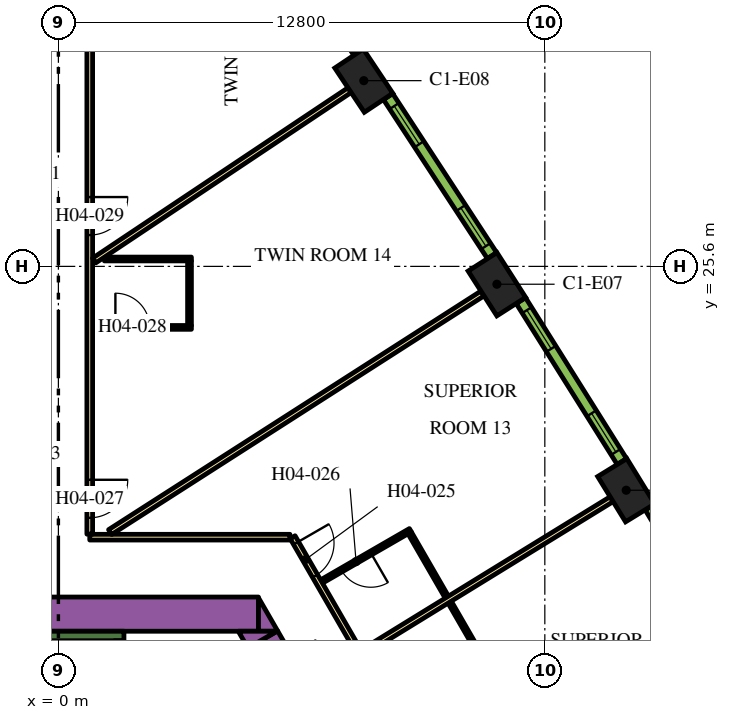
"""IFC4 building model, lengths in metres.
Left out: names, types, materials, properties, quantities, classifications, styles, units other than length and angle.
Written with IfcOpenShell. Run it as: python <this file> out.ifc"""

import sys

from ifc_helpers import new_model, si_unit, direction, frame, frame_2d, origin, origin_2d, place, context, subcontext, project, spatial, polyline, rectangle, outline, extrude, element, fill, save


model = new_model("IFC4")
c1 = context("Model", 3, precision=1e-05, world=origin(), true_north=direction((0.0, 1.0)))
c2 = subcontext(c1, "Body", "Model", "MODEL_VIEW")
j1 = project(units=[si_unit("LENGTHUNIT", "METRE"), si_unit("PLANEANGLEUNIT", "RADIAN")], contexts=[c1])
p1 = place(None, origin())
s1 = spatial("IfcSite", under=j1, at=p1, CompositionType="ELEMENT")
p2 = place(p1, origin())
s2 = spatial("IfcBuilding", under=s1, at=p2, CompositionType="ELEMENT")
p3 = place(p2, frame((0.0, 0.0, 66.6)))
s3 = spatial("IfcBuildingStorey", under=s2, at=p3, CompositionType="ELEMENT", Elevation=66.6)
for number, where, z_axis, x_axis in (
    (1, (14.942, 19.71, 0.0), (0.0, 0.0, 1.0), (-0.524, 0.852, 0.0)),
    (2, (11.539, 25.131, 0.0), (0.0, 0.0, 1.0), (-0.539, 0.842, 0.0)),
    (3, (8.037, 30.487, 0.0), (0.0, 0.0, 1.0), (-0.555, 0.832, 0.0)),
):
    element("IfcColumn", number, at=place(p3, frame(where, z_axis=z_axis, x_axis=x_axis)), inside=s3, PredefinedType="COLUMN", context=c2, shape_type="SweptSolid", body=[
        extrude(rectangle(XDim=1.4, YDim=0.9, at=origin_2d()), origin(), (0.0, 0.0, 1.0), 3.9),
    ])
p4 = place(p3, frame((-4.224, 16.45, 0.0), z_axis=(0.0, 0.0, 1.0), x_axis=(1.0, 0.0, 0.0)))
e4 = element("IfcWall", 4, at=p4, inside=s3, PredefinedType="SOLIDWALL", context=c2, shape_type="SweptSolid", body=[
    extrude(rectangle(XDim=9.488, YDim=0.9, at=frame_2d((4.744, 0.0))), origin(), (0.0, 0.0, 1.0), 3.9),
])
p5 = place(p3, origin())
e5 = element("IfcWall", 5, at=p5, inside=s3, PredefinedType="SOLIDWALL", context=c2, shape_type="SweptSolid", body=[
    extrude(outline(polyline([(5.265, 16.0), (5.265, 16.88), (5.773, 16.0), (5.265, 16.0)])), origin(), (0.0, 0.0, 1.0), 3.9),
])
p6 = place(p3, frame((5.611, 15.382, 0.0), z_axis=(0.0, 0.0, 1.0), x_axis=(-0.500102178127, 0.865966403178, 0.0)))
e6 = element("IfcWall", 6, at=p6, inside=s3, PredefinedType="SOLIDWALL", context=c2, shape_type="SweptSolid", body=[
    extrude(rectangle(XDim=0.464, YDim=0.9, at=frame_2d((0.232, 0.0))), origin(), (0.0, 0.0, 1.0), 3.9),
])
e7 = element("IfcWall", 7, at=p5, inside=s3, PredefinedType="SOLIDWALL", context=c2, shape_type="SweptSolid", body=[
    extrude(outline(polyline([(4.734, 16.0), (5.75, 16.0), (4.988, 15.56), (4.734, 16.0)])), origin(), (0.0, 0.0, 1.0), 3.9),
])
p7 = place(p3, frame((-1.725, 15.875, 0.0), z_axis=(0.0, 0.0, 1.0), x_axis=(1.0, 0.0, 0.0)))
e8 = element("IfcWall", 8, at=p7, inside=s3, PredefinedType="SOLIDWALL", context=c2, shape_type="SweptSolid", body=[
    extrude(rectangle(XDim=3.45, YDim=0.25, at=frame_2d((1.725, 0.0))), origin(), (0.0, 0.0, 1.0), 3.9),
])
p8 = place(p3, frame((6.163, 18.475, 0.0), z_axis=(0.0, 0.0, 1.0), x_axis=(0.500001317485, -0.866024643133, 0.0)))
e9 = element("IfcWall", 9, at=p8, inside=s3, PredefinedType="PARTITIONING", context=c2, shape_type="SweptSolid", body=[
    extrude(rectangle(XDim=25.767, YDim=0.15, at=frame_2d((12.883, 0.0))), origin(), (0.0, 0.0, 1.0), 2.75),
])
p9 = place(p8, frame((21.138, 0.0, 0.0)))
e10 = element("IfcOpeningElement", 10, at=p9, cuts=e9, PredefinedType="OPENING", context=c2, shape_type="SweptSolid", body=[
    extrude(rectangle(XDim=1.0, YDim=2.1, at=frame_2d((0.5, 1.05))), frame((0.0, 0.085, 0.0), z_axis=(0.0, -1.0, 0.0), x_axis=(1.0, 0.0, 0.0)), (0.0, 0.0, 1.0), 0.17),
])
p10 = place(p8, frame((9.948, 0.0, 0.0)))
e11 = element("IfcOpeningElement", 11, at=p10, cuts=e9, PredefinedType="OPENING", context=c2, shape_type="SweptSolid", body=[
    extrude(rectangle(XDim=1.1, YDim=2.1, at=frame_2d((0.55, 1.05))), frame((0.0, 0.085, 0.0), z_axis=(0.0, -1.0, 0.0), x_axis=(1.0, 0.0, 0.0)), (0.0, 0.0, 1.0), 0.17),
])
p11 = place(p8, frame((8.641, 0.0, 0.0)))
e12 = element("IfcOpeningElement", 12, at=p11, cuts=e9, PredefinedType="OPENING", context=c2, shape_type="SweptSolid", body=[
    extrude(rectangle(XDim=1.0, YDim=2.1, at=frame_2d((0.5, 1.05))), frame((0.0, 0.085, 0.0), z_axis=(0.0, -1.0, 0.0), x_axis=(1.0, 0.0, 0.0)), (0.0, 0.0, 1.0), 0.17),
])
p12 = place(p8, frame((0.18, 0.0, 0.0)))
e13 = element("IfcOpeningElement", 13, at=p12, cuts=e9, PredefinedType="OPENING", context=c2, shape_type="SweptSolid", body=[
    extrude(rectangle(XDim=1.0, YDim=2.1, at=frame_2d((0.5, 1.05))), frame((0.0, 0.085, 0.0), z_axis=(0.0, -1.0, 0.0), x_axis=(1.0, 0.0, 0.0)), (0.0, 0.0, 1.0), 0.17),
])
p13 = place(p3, frame((0.825, 18.475, 0.0), z_axis=(0.0, 0.0, 1.0), x_axis=(1.0, 0.0, 0.0)))
e14 = element("IfcWall", 14, at=p13, inside=s3, PredefinedType="PARTITIONING", context=c2, shape_type="SweptSolid", body=[
    extrude(rectangle(XDim=5.268, YDim=0.15, at=frame_2d((2.634, 0.0))), origin(), (0.0, 0.0, 1.0), 2.75),
])
p14 = place(p3, frame((0.825, 34.699, 0.0), z_axis=(0.0, 0.0, 1.0), x_axis=(0.0, -1.0, 0.0)))
e15 = element("IfcWall", 15, at=p14, inside=s3, PredefinedType="PARTITIONING", context=c2, shape_type="SweptSolid", body=[
    extrude(rectangle(XDim=16.144, YDim=0.15, at=frame_2d((8.072, 0.0))), origin(), (0.0, 0.0, 1.0), 2.75),
])
p15 = place(p14, frame((14.714, 0.0, 0.0)))
e16 = element("IfcOpeningElement", 16, at=p15, cuts=e15, PredefinedType="OPENING", context=c2, shape_type="SweptSolid", body=[
    extrude(rectangle(XDim=1.0, YDim=2.1, at=frame_2d((0.5, 1.05))), frame((0.0, 0.085, 0.0), z_axis=(0.0, -1.0, 0.0), x_axis=(1.0, 0.0, 0.0)), (0.0, 0.0, 1.0), 0.17),
])
p16 = place(p14, frame((7.275, 0.0, 0.0)))
e17 = element("IfcOpeningElement", 17, at=p16, cuts=e15, PredefinedType="OPENING", context=c2, shape_type="SweptSolid", body=[
    extrude(rectangle(XDim=1.0, YDim=2.1, at=frame_2d((0.5, 1.05))), frame((0.0, 0.085, 0.0), z_axis=(0.0, -1.0, 0.0), x_axis=(1.0, 0.0, 0.0)), (0.0, 0.0, 1.0), 0.17),
])
p17 = place(p3, frame((7.662, 30.238, 0.0), z_axis=(0.0, 0.0, 1.0), x_axis=(-0.831882886825, -0.554951225431, 0.0)))
e18 = element("IfcWall", 18, at=p17, inside=s3, PredefinedType="PARTITIONING", context=c2, shape_type="SweptSolid", body=[
    extrude(rectangle(XDim=8.079, YDim=0.15, at=frame_2d((4.04, 0.0))), origin(), (0.0, 0.0, 1.0), 2.75),
])
p18 = place(p3, frame((11.16, 24.888, 0.0), z_axis=(0.0, 0.0, 1.0), x_axis=(-0.84199813156, -0.539480441211, 0.0)))
e19 = element("IfcWall", 19, at=p18, inside=s3, PredefinedType="PARTITIONING", context=c2, shape_type="SweptSolid", body=[
    extrude(rectangle(XDim=11.638, YDim=0.15, at=frame_2d((5.819, 0.0))), origin(), (0.0, 0.0, 1.0), 2.75),
])
p19 = place(p3, frame((14.558, 19.475, 0.0), z_axis=(0.0, 0.0, 1.0), x_axis=(-0.851829455142, -0.523819223925, 0.0)))
e20 = element("IfcWall", 20, at=p19, inside=s3, PredefinedType="PARTITIONING", context=c2, shape_type="SweptSolid", body=[
    extrude(rectangle(XDim=7.688, YDim=0.15, at=frame_2d((3.844, 0.0))), origin(), (0.0, 0.0, 1.0), 2.75),
])
p20 = place(p3, frame((11.342, 14.955, 0.0), z_axis=(0.0, 0.0, 1.0), x_axis=(-0.500008976872, 0.866020220923, 0.0)))
e21 = element("IfcWall", 21, at=p20, inside=s3, PredefinedType="PARTITIONING", context=c2, shape_type="SweptSolid", body=[
    extrude(rectangle(XDim=2.09, YDim=0.1, at=frame_2d((1.045, 0.0))), origin(), (0.0, 0.0, 1.0), 2.75),
])
p21 = place(p3, frame((9.262, 18.658, 0.0), z_axis=(0.0, 0.0, 1.0), x_axis=(-0.866019956843, -0.50000943426, 0.0)))
e22 = element("IfcWall", 22, at=p21, inside=s3, PredefinedType="PARTITIONING", context=c2, shape_type="SweptSolid", body=[
    extrude(rectangle(XDim=2.7, YDim=0.1, at=frame_2d((1.35, 0.0))), origin(), (0.0, 0.0, 1.0), 2.75),
])
p22 = place(p21, frame((1.2, 0.0, 0.0)))
e23 = element("IfcOpeningElement", 23, at=p22, cuts=e22, PredefinedType="OPENING", context=c2, shape_type="SweptSolid", body=[
    extrude(rectangle(XDim=0.9, YDim=2.1, at=frame_2d((0.45, 1.05))), frame((0.0, 0.06, 0.0), z_axis=(0.0, -1.0, 0.0), x_axis=(1.0, 0.0, 0.0)), (0.0, 0.0, 1.0), 0.12),
])
p23 = place(p3, frame((9.244, 18.589, 0.0), z_axis=(0.0, 0.0, 1.0), x_axis=(0.500043961785, -0.866000020948, 0.0)))
e24 = element("IfcWall", 24, at=p23, inside=s3, PredefinedType="PARTITIONING", context=c2, shape_type="SweptSolid", body=[
    extrude(rectangle(XDim=1.95, YDim=0.1, at=frame_2d((0.975, 0.0))), origin(), (0.0, 0.0, 1.0), 2.75),
])
p24 = place(p3, frame((0.9, 23.994, 0.0), z_axis=(0.0, 0.0, 1.0), x_axis=(1.0, 0.0, 0.0)))
e25 = element("IfcWall", 25, at=p24, inside=s3, PredefinedType="PARTITIONING", context=c2, shape_type="SweptSolid", body=[
    extrude(rectangle(XDim=2.6, YDim=0.1, at=frame_2d((1.3, 0.0))), origin(), (0.0, 0.0, 1.0), 2.75),
])
p25 = place(p24, frame((0.6, 0.0, 0.0)))
e26 = element("IfcOpeningElement", 26, at=p25, cuts=e25, PredefinedType="OPENING", context=c2, shape_type="SweptSolid", body=[
    extrude(rectangle(XDim=0.9, YDim=2.1, at=frame_2d((0.45, 1.05))), frame((0.0, 0.06, 0.0), z_axis=(0.0, -1.0, 0.0), x_axis=(1.0, 0.0, 0.0)), (0.0, 0.0, 1.0), 0.12),
])
p26 = place(p3, frame((3.45, 24.044, 0.0), z_axis=(0.0, 0.0, 1.0), x_axis=(0.0, 1.0, 0.0)))
e27 = element("IfcWall", 27, at=p26, inside=s3, PredefinedType="PARTITIONING", context=c2, shape_type="SweptSolid", body=[
    extrude(rectangle(XDim=1.7, YDim=0.1, at=frame_2d((0.85, 0.0))), origin(), (0.0, 0.0, 1.0), 2.75),
])
p27 = place(p3, frame((1.21, 25.794, 0.0), z_axis=(0.0, 0.0, 1.0), x_axis=(1.0, 0.0, 0.0)))
e28 = element("IfcWall", 28, at=p27, inside=s3, PredefinedType="PARTITIONING", context=c2, shape_type="SweptSolid", body=[
    extrude(rectangle(XDim=2.29, YDim=0.1, at=frame_2d((1.145, 0.0))), origin(), (0.0, 0.0, 1.0), 2.75),
])
p28 = place(p3, frame((18.143, 14.986, 0.0), z_axis=(0.0, 0.0, 1.0), x_axis=(-0.515938796285, 0.856625448191, 0.0)))
e29 = element("IfcWall", 29, at=p28, inside=s3, PredefinedType="SOLIDWALL", context=c2, shape_type="SweptSolid", body=[
    extrude(rectangle(XDim=4.998, YDim=0.29, at=frame_2d((2.499, 0.0))), origin(), (0.0, 0.0, 1.0), 3.65),
])
p29 = place(p28, frame((0.297, 0.0, 0.9)))
e30 = element("IfcOpeningElement", 30, at=p29, cuts=e29, PredefinedType="OPENING", context=c2, shape_type="SweptSolid", body=[
    extrude(rectangle(XDim=1.2, YDim=2.15, at=frame_2d((0.6, 1.075))), frame((0.0, 0.155, 0.0), z_axis=(0.0, -1.0, 0.0), x_axis=(1.0, 0.0, 0.0)), (0.0, 0.0, 1.0), 0.31),
])
p30 = place(p28, frame((3.501, 0.0, 0.9)))
e31 = element("IfcOpeningElement", 31, at=p30, cuts=e29, PredefinedType="OPENING", context=c2, shape_type="SweptSolid", body=[
    extrude(rectangle(XDim=1.2, YDim=2.15, at=frame_2d((0.6, 1.075))), frame((0.0, 0.155, 0.0), z_axis=(0.0, -1.0, 0.0), x_axis=(1.0, 0.0, 0.0)), (0.0, 0.0, 1.0), 0.31),
])
p31 = place(p3, frame((14.827, 20.466, 0.0), z_axis=(0.0, 0.0, 1.0), x_axis=(-0.531688286542, 0.846940119462, 0.0)))
e32 = element("IfcWall", 32, at=p31, inside=s3, PredefinedType="SOLIDWALL", context=c2, shape_type="SweptSolid", body=[
    extrude(rectangle(XDim=4.998, YDim=0.29, at=frame_2d((2.499, 0.0))), origin(), (0.0, 0.0, 1.0), 3.65),
])
p32 = place(p31, frame((0.297, 0.0, 0.9)))
e33 = element("IfcOpeningElement", 33, at=p32, cuts=e32, PredefinedType="OPENING", context=c2, shape_type="SweptSolid", body=[
    extrude(rectangle(XDim=1.2, YDim=2.15, at=frame_2d((0.6, 1.075))), frame((0.0, 0.155, 0.0), z_axis=(0.0, -1.0, 0.0), x_axis=(1.0, 0.0, 0.0)), (0.0, 0.0, 1.0), 0.31),
])
p33 = place(p31, frame((3.501, 0.0, 0.9)))
e34 = element("IfcOpeningElement", 34, at=p33, cuts=e32, PredefinedType="OPENING", context=c2, shape_type="SweptSolid", body=[
    extrude(rectangle(XDim=1.2, YDim=2.15, at=frame_2d((0.6, 1.075))), frame((0.0, 0.155, 0.0), z_axis=(0.0, -1.0, 0.0), x_axis=(1.0, 0.0, 0.0)), (0.0, 0.0, 1.0), 0.31),
])
p34 = place(p3, frame((11.411, 25.884, 0.0), z_axis=(0.0, 0.0, 1.0), x_axis=(-0.547204617628, 0.836998868845, 0.0)))
e35 = element("IfcWall", 35, at=p34, inside=s3, PredefinedType="SOLIDWALL", context=c2, shape_type="SweptSolid", body=[
    extrude(rectangle(XDim=4.998, YDim=0.29, at=frame_2d((2.499, 0.0))), origin(), (0.0, 0.0, 1.0), 3.65),
])
p35 = place(p34, frame((0.297, 0.0, 0.9)))
e36 = element("IfcOpeningElement", 36, at=p35, cuts=e35, PredefinedType="OPENING", context=c2, shape_type="SweptSolid", body=[
    extrude(rectangle(XDim=1.2, YDim=2.15, at=frame_2d((0.6, 1.075))), frame((0.0, 0.155, 0.0), z_axis=(0.0, -1.0, 0.0), x_axis=(1.0, 0.0, 0.0)), (0.0, 0.0, 1.0), 0.31),
])
p36 = place(p34, frame((3.501, 0.0, 0.9)))
e37 = element("IfcOpeningElement", 37, at=p36, cuts=e35, PredefinedType="OPENING", context=c2, shape_type="SweptSolid", body=[
    extrude(rectangle(XDim=1.2, YDim=2.15, at=frame_2d((0.6, 1.075))), frame((0.0, 0.155, 0.0), z_axis=(0.0, -1.0, 0.0), x_axis=(1.0, 0.0, 0.0)), (0.0, 0.0, 1.0), 0.31),
])
p37 = place(p3, frame((7.895, 31.238, 0.0), z_axis=(0.0, 0.0, 1.0), x_axis=(-0.562610153679, 0.826722332454, 0.0)))
e38 = element("IfcWall", 38, at=p37, inside=s3, PredefinedType="SOLIDWALL", context=c2, shape_type="SweptSolid", body=[
    extrude(rectangle(XDim=5.006, YDim=0.29, at=frame_2d((2.503, 0.0))), origin(), (0.0, 0.0, 1.0), 3.65),
])
p38 = place(p37, frame((0.31, 0.0, 0.9)))
e39 = element("IfcOpeningElement", 39, at=p38, cuts=e38, PredefinedType="OPENING", context=c2, shape_type="SweptSolid", body=[
    extrude(rectangle(XDim=1.2, YDim=2.15, at=frame_2d((0.6, 1.075))), frame((0.0, 0.155, 0.0), z_axis=(0.0, -1.0, 0.0), x_axis=(1.0, 0.0, 0.0)), (0.0, 0.0, 1.0), 0.31),
])
p39 = place(p37, frame((3.541, 0.0, 0.9)))
e40 = element("IfcOpeningElement", 40, at=p39, cuts=e38, PredefinedType="OPENING", context=c2, shape_type="SweptSolid", body=[
    extrude(rectangle(XDim=1.2, YDim=2.15, at=frame_2d((0.6, 1.075))), frame((0.0, 0.155, 0.0), z_axis=(0.0, -1.0, 0.0), x_axis=(1.0, 0.0, 0.0)), (0.0, 0.0, 1.0), 0.31),
])
p40 = place(p12, origin())
e41 = element("IfcDoor", 41, at=p40, inside=s3, OperationType="SINGLE_SWING_LEFT", PredefinedType="DOOR", context=c2, shape_type="SweptSolid", body=[
    extrude(rectangle(XDim=1.0, YDim=2.1, at=frame_2d((0.5, 1.05))), frame((0.0, 0.025, 0.0), z_axis=(0.0, -1.0, 0.0), x_axis=(1.0, 0.0, 0.0)), (0.0, 0.0, 1.0), 0.05),
])
fill(e13, e41)
p41 = place(p22, origin())
e42 = element("IfcDoor", 42, at=p41, inside=s3, OperationType="SINGLE_SWING_LEFT", PredefinedType="DOOR", context=c2, shape_type="SweptSolid", body=[
    extrude(rectangle(XDim=0.9, YDim=2.1, at=frame_2d((0.45, 1.05))), frame((0.0, 0.025, 0.0), z_axis=(0.0, -1.0, 0.0), x_axis=(1.0, 0.0, 0.0)), (0.0, 0.0, 1.0), 0.05),
])
fill(e23, e42)
p42 = place(p15, origin())
e43 = element("IfcDoor", 43, at=p42, inside=s3, OperationType="SINGLE_SWING_RIGHT", PredefinedType="DOOR", context=c2, shape_type="SweptSolid", body=[
    extrude(rectangle(XDim=1.0, YDim=2.1, at=frame_2d((0.5, 1.05))), frame((0.0, 0.025, 0.0), z_axis=(0.0, -1.0, 0.0), x_axis=(1.0, 0.0, 0.0)), (0.0, 0.0, 1.0), 0.05),
])
fill(e16, e43)
p43 = place(p25, origin())
e44 = element("IfcDoor", 44, at=p43, inside=s3, OperationType="SINGLE_SWING_LEFT", PredefinedType="DOOR", context=c2, shape_type="SweptSolid", body=[
    extrude(rectangle(XDim=0.9, YDim=2.1, at=frame_2d((0.45, 1.05))), frame((0.0, 0.025, 0.0), z_axis=(0.0, -1.0, 0.0), x_axis=(1.0, 0.0, 0.0)), (0.0, 0.0, 1.0), 0.05),
])
fill(e26, e44)
p44 = place(p16, origin())
e45 = element("IfcDoor", 45, at=p44, inside=s3, OperationType="SINGLE_SWING_RIGHT", PredefinedType="DOOR", context=c2, shape_type="SweptSolid", body=[
    extrude(rectangle(XDim=1.0, YDim=2.1, at=frame_2d((0.5, 1.05))), frame((0.0, 0.025, 0.0), z_axis=(0.0, -1.0, 0.0), x_axis=(1.0, 0.0, 0.0)), (0.0, 0.0, 1.0), 0.05),
])
fill(e17, e45)
p45 = place(p32, origin())
e46 = element("IfcWindow", 46, at=p45, inside=s3, PartitioningType="DOUBLE_PANEL_VERTICAL", PredefinedType="WINDOW", context=c2, shape_type="SweptSolid", body=[
    extrude(rectangle(XDim=1.2, YDim=2.15, at=frame_2d((0.6, 1.075))), frame((0.0, 0.015, 0.0), z_axis=(0.0, -1.0, 0.0), x_axis=(1.0, 0.0, 0.0)), (0.0, 0.0, 1.0), 0.06),
])
fill(e33, e46)
p46 = place(p33, origin())
e47 = element("IfcWindow", 47, at=p46, inside=s3, PartitioningType="DOUBLE_PANEL_VERTICAL", PredefinedType="WINDOW", context=c2, shape_type="SweptSolid", body=[
    extrude(rectangle(XDim=1.2, YDim=2.15, at=frame_2d((0.6, 1.075))), frame((0.0, 0.015, 0.0), z_axis=(0.0, -1.0, 0.0), x_axis=(1.0, 0.0, 0.0)), (0.0, 0.0, 1.0), 0.06),
])
fill(e34, e47)
p47 = place(p35, origin())
e48 = element("IfcWindow", 48, at=p47, inside=s3, PartitioningType="DOUBLE_PANEL_VERTICAL", PredefinedType="WINDOW", context=c2, shape_type="SweptSolid", body=[
    extrude(rectangle(XDim=1.2, YDim=2.15, at=frame_2d((0.6, 1.075))), frame((0.0, 0.015, 0.0), z_axis=(0.0, -1.0, 0.0), x_axis=(1.0, 0.0, 0.0)), (0.0, 0.0, 1.0), 0.06),
])
fill(e36, e48)
p48 = place(p36, origin())
e49 = element("IfcWindow", 49, at=p48, inside=s3, PartitioningType="DOUBLE_PANEL_VERTICAL", PredefinedType="WINDOW", context=c2, shape_type="SweptSolid", body=[
    extrude(rectangle(XDim=1.2, YDim=2.15, at=frame_2d((0.6, 1.075))), frame((0.0, 0.015, 0.0), z_axis=(0.0, -1.0, 0.0), x_axis=(1.0, 0.0, 0.0)), (0.0, 0.0, 1.0), 0.06),
])
fill(e37, e49)
save(model, sys.argv[1])
